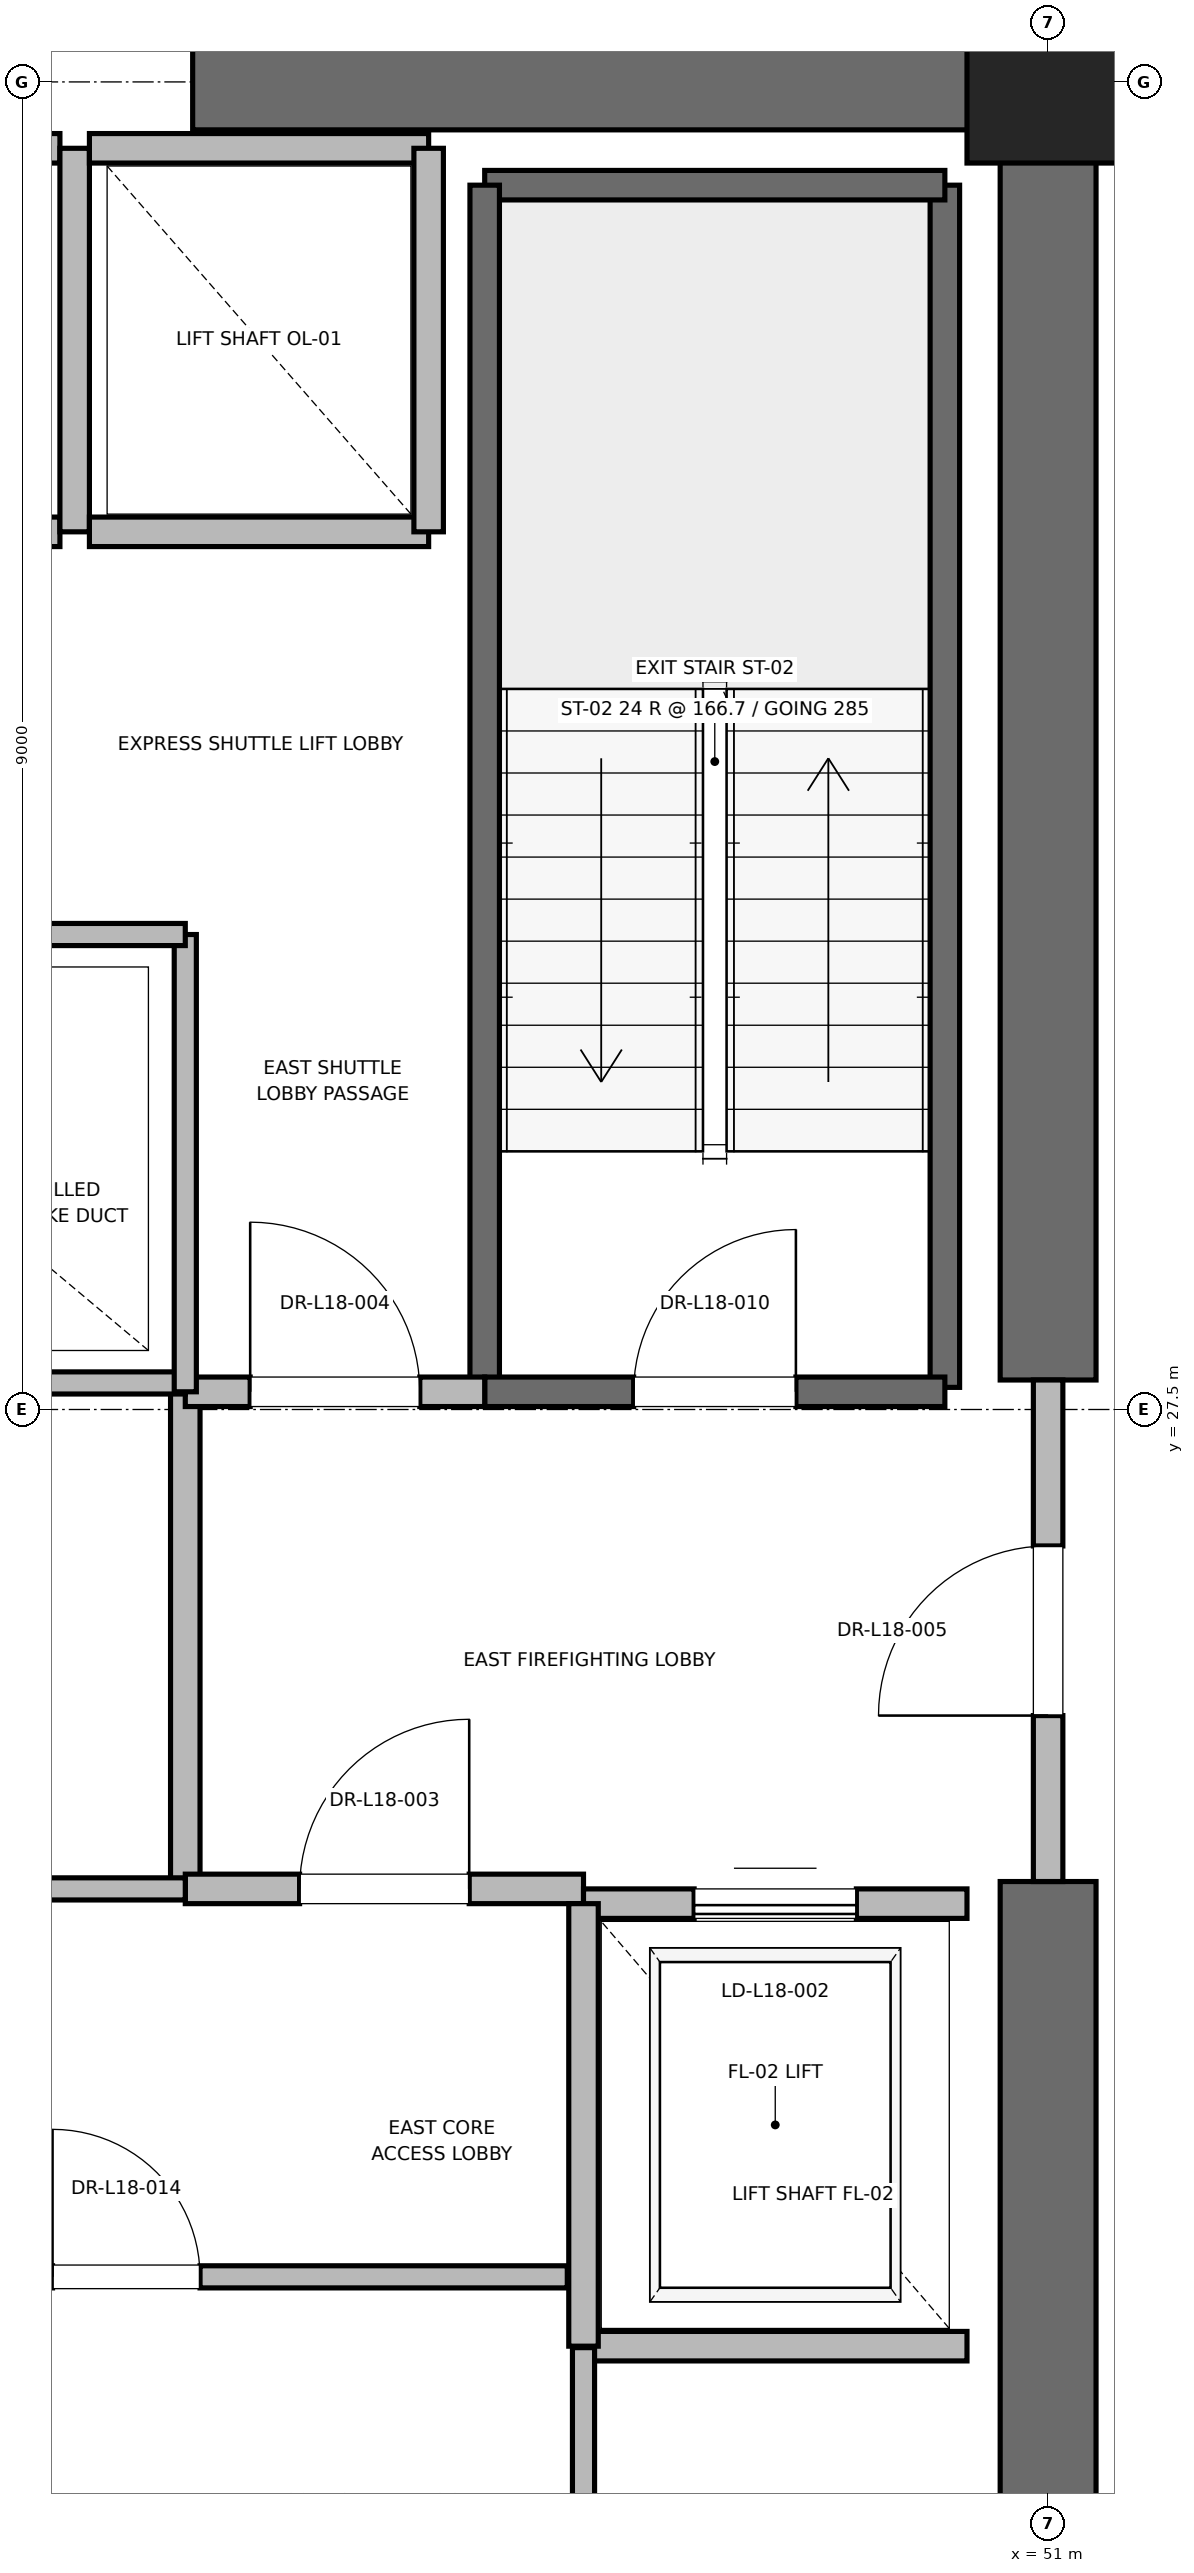
"""IFC4 building model, lengths in metres.
Left out: names, types, materials, properties, quantities, classifications, styles, units other than length and angle.
Written with IfcOpenShell. Run it as: python <this file> out.ifc"""

import sys

from ifc_helpers import new_model, si_unit, direction, frame, frame_2d, origin, origin_2d, place, context, subcontext, project, spatial, rectangle, extrude, element, fill, save


model = new_model("IFC4")
c1 = context("Model", 3, precision=1e-05, world=origin(), true_north=direction((0.0, 1.0)))
c2 = subcontext(c1, "Body", "Model", "MODEL_VIEW")
j1 = project(units=[si_unit("LENGTHUNIT", "METRE"), si_unit("PLANEANGLEUNIT", "RADIAN")], contexts=[c1])
p1 = place(None, origin())
s1 = spatial("IfcSite", under=j1, at=p1, CompositionType="ELEMENT")
p2 = place(p1, origin())
s2 = spatial("IfcBuilding", under=s1, at=p2, CompositionType="ELEMENT")
p3 = place(p2, frame((0.0, 0.0, 79.6)))
s3 = spatial("IfcBuildingStorey", under=s2, at=p3, CompositionType="ELEMENT", Elevation=79.6)
p4 = place(p3, frame((51.0, 36.5, 0.0), z_axis=(0.0, 0.0, 1.0), x_axis=(1.0, 0.0, 0.0)))
e1 = element("IfcColumn", 1, at=p4, inside=s3, PredefinedType="PILASTER", context=c2, shape_type="SweptSolid", body=[
    extrude(rectangle(XDim=1.1, YDim=1.1, at=origin_2d()), origin(), (0.0, 0.0, 1.0), 4.0),
])
for number, where, z_axis, x_axis in (
    (2, (45.2, 36.5, 0.0), (0.0, 0.0, 1.0), (1.0, 0.0, 0.0)),
    (3, (51.0, 18.5, 0.0), (0.0, 0.0, 1.0), (0.0, 1.0, 0.0)),
):
    element("IfcWall", number, at=place(p3, frame(where, z_axis=z_axis, x_axis=x_axis)), inside=s3, PredefinedType="SHEAR", context=c2, shape_type="SweptSolid", body=[
        extrude(rectangle(XDim=5.8, YDim=0.65, at=frame_2d((2.9, 0.0))), origin(), (0.0, 0.0, 1.0), 3.76),
    ])
p5 = place(p3, frame((51.0, 27.7, 0.0), z_axis=(0.0, 0.0, 1.0), x_axis=(0.0, 1.0, 0.0)))
e4 = element("IfcWall", 4, at=p5, inside=s3, PredefinedType="SHEAR", context=c2, shape_type="SweptSolid", body=[
    extrude(rectangle(XDim=8.8, YDim=0.65, at=frame_2d((4.4, 0.0))), origin(), (0.0, 0.0, 1.0), 3.76),
])
p6 = place(p3, frame((50.3, 27.65, 0.0), z_axis=(0.0, 0.0, 1.0), x_axis=(0.0, 1.0, 0.0)))
e5 = element("IfcWall", 5, at=p6, inside=s3, PredefinedType="SOLIDWALL", context=c2, shape_type="SweptSolid", body=[
    extrude(rectangle(XDim=8.15, YDim=0.2, at=frame_2d((4.075, 0.0))), origin(), (0.0, 0.0, 1.0), 3.76),
])
p7 = place(p3, frame((47.18, 35.8, 0.0), z_axis=(0.0, 0.0, 1.0), x_axis=(1.0, 0.0, 0.0)))
e6 = element("IfcWall", 6, at=p7, inside=s3, PredefinedType="SOLIDWALL", context=c2, shape_type="SweptSolid", body=[
    extrude(rectangle(XDim=3.12, YDim=0.2, at=frame_2d((1.56, 0.0))), origin(), (0.0, 0.0, 1.0), 3.76),
])
p8 = place(p3, frame((47.18, 27.62, 0.0), z_axis=(0.0, 0.0, 1.0), x_axis=(0.0, 1.0, 0.0)))
e7 = element("IfcWall", 7, at=p8, inside=s3, PredefinedType="SOLIDWALL", context=c2, shape_type="SweptSolid", body=[
    extrude(rectangle(XDim=8.18, YDim=0.2, at=frame_2d((4.09, 0.0))), origin(), (0.0, 0.0, 1.0), 3.76),
])
p9 = place(p3, frame((47.18, 27.62, 0.0), z_axis=(0.0, 0.0, 1.0), x_axis=(1.0, 0.0, 0.0)))
e8 = element("IfcWall", 8, at=p9, inside=s3, PredefinedType="SOLIDWALL", context=c2, shape_type="SweptSolid", body=[
    extrude(rectangle(XDim=3.12, YDim=0.2, at=frame_2d((1.56, 0.0))), origin(), (0.0, 0.0, 1.0), 3.76),
])
p10 = place(p9, frame((1.01, 0.0, 0.0)))
e9 = element("IfcOpeningElement", 9, at=p10, cuts=e8, PredefinedType="OPENING", context=c2, shape_type="SweptSolid", body=[
    extrude(rectangle(XDim=1.1, YDim=2.15, at=frame_2d((0.55, 1.075))), frame((0.0, 0.1, 0.0), z_axis=(0.0, -1.0, 0.0), x_axis=(1.0, 0.0, 0.0)), (0.0, 0.0, 1.0), 0.2),
])
p11 = place(p3, frame((45.15, 24.25, 0.0), z_axis=(0.0, 0.0, 1.0), x_axis=(0.0, 1.0, 0.0)))
e10 = element("IfcWall", 10, at=p11, inside=s3, PredefinedType="PARTITIONING", context=c2, shape_type="SweptSolid", body=[
    extrude(rectangle(XDim=3.37, YDim=0.2, at=frame_2d((1.685, 0.0))), origin(), (0.0, 0.0, 1.0), 3.76),
])
p12 = place(p3, frame((45.15, 24.25, 0.0), z_axis=(0.0, 0.0, 1.0), x_axis=(1.0, 0.0, 0.0)))
e11 = element("IfcWall", 11, at=p12, inside=s3, PredefinedType="PARTITIONING", context=c2, shape_type="SweptSolid", body=[
    extrude(rectangle(XDim=2.7, YDim=0.2, at=frame_2d((1.35, 0.0))), origin(), (0.0, 0.0, 1.0), 3.76),
])
p13 = place(p12, frame((0.775, 0.0, 0.0)))
e12 = element("IfcOpeningElement", 12, at=p13, cuts=e11, PredefinedType="OPENING", context=c2, shape_type="SweptSolid", body=[
    extrude(rectangle(XDim=1.15, YDim=2.2, at=frame_2d((0.575, 1.1))), frame((0.0, 0.1, 0.0), z_axis=(0.0, -1.0, 0.0), x_axis=(1.0, 0.0, 0.0)), (0.0, 0.0, 1.0), 0.2),
])
p14 = place(p3, frame((45.15, 27.62, 0.0), z_axis=(0.0, 0.0, 1.0), x_axis=(1.0, 0.0, 0.0)))
e13 = element("IfcWall", 13, at=p14, inside=s3, PredefinedType="PARTITIONING", context=c2, shape_type="SweptSolid", body=[
    extrude(rectangle(XDim=2.03, YDim=0.2, at=frame_2d((1.015, 0.0))), origin(), (0.0, 0.0, 1.0), 3.76),
])
p15 = place(p14, frame((0.44, 0.0, 0.0)))
e14 = element("IfcOpeningElement", 14, at=p15, cuts=e13, PredefinedType="OPENING", context=c2, shape_type="SweptSolid", body=[
    extrude(rectangle(XDim=1.15, YDim=2.2, at=frame_2d((0.575, 1.1))), frame((0.0, 0.1, 0.0), z_axis=(0.0, -1.0, 0.0), x_axis=(1.0, 0.0, 0.0)), (0.0, 0.0, 1.0), 0.2),
])
p16 = place(p3, frame((51.0, 24.3, 0.0), z_axis=(0.0, 0.0, 1.0), x_axis=(0.0, 1.0, 0.0)))
e15 = element("IfcWall", 15, at=p16, inside=s3, PredefinedType="PARTITIONING", context=c2, shape_type="SweptSolid", body=[
    extrude(rectangle(XDim=3.4, YDim=0.2, at=frame_2d((1.7, 0.0))), origin(), (0.0, 0.0, 1.0), 2.54),
])
p17 = place(p16, frame((1.125, 0.0, 0.0)))
e16 = element("IfcOpeningElement", 16, at=p17, cuts=e15, PredefinedType="OPENING", context=c2, shape_type="SweptSolid", body=[
    extrude(rectangle(XDim=1.15, YDim=2.2, at=frame_2d((0.575, 1.1))), frame((0.0, 0.1, 0.0), z_axis=(0.0, -1.0, 0.0), x_axis=(1.0, 0.0, 0.0)), (0.0, 0.0, 1.0), 0.2),
])
p18 = place(p3, frame((47.85, 21.15, 0.0), z_axis=(0.0, 0.0, 1.0), x_axis=(1.0, 0.0, 0.0)))
e17 = element("IfcWall", 17, at=p18, inside=s3, PredefinedType="SOLIDWALL", context=c2, shape_type="SweptSolid", body=[
    extrude(rectangle(XDim=2.6, YDim=0.2, at=frame_2d((1.3, 0.0))), origin(), (0.0, 0.0, 1.0), 3.76),
])
p19 = place(p3, frame((50.45, 24.15, 0.0), z_axis=(0.0, 0.0, 1.0), x_axis=(-1.0, 0.0, 0.0)))
e18 = element("IfcWall", 18, at=p19, inside=s3, PredefinedType="SOLIDWALL", context=c2, shape_type="SweptSolid", body=[
    extrude(rectangle(XDim=2.6, YDim=0.2, at=frame_2d((1.3, 0.0))), origin(), (0.0, 0.0, 1.0), 2.54),
])
p20 = place(p19, frame((0.75, 0.0, 0.0)))
e19 = element("IfcOpeningElement", 19, at=p20, cuts=e18, PredefinedType="OPENING", context=c2, shape_type="SweptSolid", body=[
    extrude(rectangle(XDim=1.1, YDim=2.2, at=frame_2d((0.55, 1.1))), frame((0.0, 0.1, 0.0), z_axis=(0.0, -1.0, 0.0), x_axis=(1.0, 0.0, 0.0)), (0.0, 0.0, 1.0), 0.2),
])
p21 = place(p3, frame((47.85, 24.15, 0.0), z_axis=(0.0, 0.0, 1.0), x_axis=(0.0, -1.0, 0.0)))
e20 = element("IfcWall", 20, at=p21, inside=s3, PredefinedType="SOLIDWALL", context=c2, shape_type="SweptSolid", body=[
    extrude(rectangle(XDim=3.0, YDim=0.2, at=frame_2d((1.5, 0.0))), origin(), (0.0, 0.0, 1.0), 3.76),
])
p22 = place(p3, frame((42.0, 33.45, 0.0), z_axis=(0.0, 0.0, 1.0), x_axis=(1.0, 0.0, 0.0)))
e21 = element("IfcWall", 21, at=p22, inside=s3, PredefinedType="SOLIDWALL", context=c2, shape_type="SweptSolid", body=[
    extrude(rectangle(XDim=2.3, YDim=0.2, at=frame_2d((1.15, 0.0))), origin(), (0.0, 0.0, 1.0), 3.76),
])
p23 = place(p3, frame((44.3, 36.05, 0.0), z_axis=(0.0, 0.0, 1.0), x_axis=(-1.0, 0.0, 0.0)))
e22 = element("IfcWall", 22, at=p23, inside=s3, PredefinedType="SOLIDWALL", context=c2, shape_type="SweptSolid", body=[
    extrude(rectangle(XDim=2.3, YDim=0.2, at=frame_2d((1.15, 0.0))), origin(), (0.0, 0.0, 1.0), 2.54),
])
p24 = place(p3, frame((44.4, 33.45, 0.0), z_axis=(0.0, 0.0, 1.0), x_axis=(0.0, 1.0, 0.0)))
e23 = element("IfcWall", 23, at=p24, inside=s3, PredefinedType="SOLIDWALL", context=c2, shape_type="SweptSolid", body=[
    extrude(rectangle(XDim=2.6, YDim=0.2, at=frame_2d((1.3, 0.0))), origin(), (0.0, 0.0, 1.0), 2.54),
])
p25 = place(p3, frame((44.5, 33.45, 0.0), z_axis=(0.0, 0.0, 1.0), x_axis=(1.0, 0.0, 0.0)))
e24 = element("IfcWall", 24, at=p25, inside=s3, PredefinedType="SOLIDWALL", context=c2, shape_type="SweptSolid", body=[
    extrude(rectangle(XDim=2.3, YDim=0.2, at=frame_2d((1.15, 0.0))), origin(), (0.0, 0.0, 1.0), 3.76),
])
p26 = place(p3, frame((46.8, 36.05, 0.0), z_axis=(0.0, 0.0, 1.0), x_axis=(-1.0, 0.0, 0.0)))
e25 = element("IfcWall", 25, at=p26, inside=s3, PredefinedType="SOLIDWALL", context=c2, shape_type="SweptSolid", body=[
    extrude(rectangle(XDim=2.3, YDim=0.2, at=frame_2d((1.15, 0.0))), origin(), (0.0, 0.0, 1.0), 2.54),
])
p27 = place(p3, frame((46.8, 33.45, 0.0), z_axis=(0.0, 0.0, 1.0), x_axis=(0.0, 1.0, 0.0)))
e26 = element("IfcWall", 26, at=p27, inside=s3, PredefinedType="SOLIDWALL", context=c2, shape_type="SweptSolid", body=[
    extrude(rectangle(XDim=2.6, YDim=0.2, at=frame_2d((1.3, 0.0))), origin(), (0.0, 0.0, 1.0), 3.76),
])
p28 = place(p3, frame((41.56, 27.68, 0.0), z_axis=(0.0, 0.0, 1.0), x_axis=(1.0, 0.0, 0.0)))
e27 = element("IfcWall", 27, at=p28, inside=s3, PredefinedType="PARTITIONING", context=c2, shape_type="SweptSolid", body=[
    extrude(rectangle(XDim=3.59, YDim=0.15, at=frame_2d((1.795, 0.0))), origin(), (0.0, 0.0, 1.0), 2.85),
])
p29 = place(p3, frame((47.85, 18.6, 0.0), z_axis=(0.0, 0.0, 1.0), x_axis=(0.0, 1.0, 0.0)))
e28 = element("IfcWall", 28, at=p29, inside=s3, PredefinedType="PARTITIONING", context=c2, shape_type="SweptSolid", body=[
    extrude(rectangle(XDim=2.54, YDim=0.15, at=frame_2d((1.27, 0.0))), origin(), (0.0, 0.0, 1.0), 2.85),
])
p30 = place(p3, frame((41.76, 21.62, 0.0), z_axis=(0.0, 0.0, 1.0), x_axis=(1.0, 0.0, 0.0)))
e29 = element("IfcWall", 29, at=p30, inside=s3, PredefinedType="PARTITIONING", context=c2, shape_type="SweptSolid", body=[
    extrude(rectangle(XDim=5.98, YDim=0.15, at=frame_2d((2.99, 0.0))), origin(), (0.0, 0.0, 1.0), 2.85),
])
p31 = place(p30, frame((2.49, 0.0, 0.0)))
e30 = element("IfcOpeningElement", 30, at=p31, cuts=e29, PredefinedType="OPENING", context=c2, shape_type="SweptSolid", body=[
    extrude(rectangle(XDim=1.0, YDim=2.15, at=frame_2d((0.5, 1.075))), frame((0.0, 0.075, 0.0), z_axis=(0.0, -1.0, 0.0), x_axis=(1.0, 0.0, 0.0)), (0.0, 0.0, 1.0), 0.15),
])
p32 = place(p3, frame((41.76, 24.25, 0.0), z_axis=(0.0, 0.0, 1.0), x_axis=(1.0, 0.0, 0.0)))
e31 = element("IfcWall", 31, at=p32, inside=s3, PredefinedType="PARTITIONING", context=c2, shape_type="SweptSolid", body=[
    extrude(rectangle(XDim=3.39, YDim=0.15, at=frame_2d((1.695, 0.0))), origin(), (0.0, 0.0, 1.0), 2.85),
])
p33 = place(p32, frame((1.195, 0.0, 0.0)))
e32 = element("IfcOpeningElement", 32, at=p33, cuts=e31, PredefinedType="OPENING", context=c2, shape_type="SweptSolid", body=[
    extrude(rectangle(XDim=1.0, YDim=2.15, at=frame_2d((0.5, 1.075))), frame((0.0, 0.075, 0.0), z_axis=(0.0, -1.0, 0.0), x_axis=(1.0, 0.0, 0.0)), (0.0, 0.0, 1.0), 0.15),
])
p34 = place(p3, frame((45.15, 27.62, 0.0), z_axis=(0.0, 0.0, 1.0), x_axis=(0.0, 1.0, 0.0)))
e33 = element("IfcWall", 33, at=p34, inside=s3, PredefinedType="PARTITIONING", context=c2, shape_type="SweptSolid", body=[
    extrude(rectangle(XDim=3.1, YDim=0.15, at=frame_2d((1.55, 0.0))), origin(), (0.0, 0.0, 1.0), 2.85),
])
p35 = place(p3, frame((41.56, 30.72, 0.0), z_axis=(0.0, 0.0, 1.0), x_axis=(1.0, 0.0, 0.0)))
e34 = element("IfcWall", 34, at=p35, inside=s3, PredefinedType="PARTITIONING", context=c2, shape_type="SweptSolid", body=[
    extrude(rectangle(XDim=3.59, YDim=0.15, at=frame_2d((1.795, 0.0))), origin(), (0.0, 0.0, 1.0), 2.85),
])
p36 = place(p35, frame((1.355, 0.0, 0.0)))
e35 = element("IfcOpeningElement", 35, at=p36, cuts=e34, PredefinedType="OPENING", context=c2, shape_type="SweptSolid", body=[
    extrude(rectangle(XDim=0.88, YDim=2.1, at=frame_2d((0.44, 1.05))), frame((0.0, 0.075, 0.0), z_axis=(0.0, -1.0, 0.0), x_axis=(1.0, 0.0, 0.0)), (0.0, 0.0, 1.0), 0.15),
])
p37 = place(p10, origin())
e36 = element("IfcDoor", 36, at=p37, inside=s3, OperationType="SINGLE_SWING_RIGHT", PredefinedType="DOOR", context=c2, shape_type="SweptSolid", body=[
    extrude(rectangle(XDim=1.1, YDim=2.15, at=frame_2d((0.55, 1.075))), frame((0.0, 0.025, 0.0), z_axis=(0.0, -1.0, 0.0), x_axis=(1.0, 0.0, 0.0)), (0.0, 0.0, 1.0), 0.05),
])
fill(e9, e36)
p38 = place(p13, origin())
e37 = element("IfcDoor", 37, at=p38, inside=s3, OperationType="SINGLE_SWING_RIGHT", PredefinedType="DOOR", context=c2, shape_type="SweptSolid", body=[
    extrude(rectangle(XDim=1.15, YDim=2.2, at=frame_2d((0.575, 1.1))), frame((0.0, 0.025, 0.0), z_axis=(0.0, -1.0, 0.0), x_axis=(1.0, 0.0, 0.0)), (0.0, 0.0, 1.0), 0.05),
])
fill(e12, e37)
p39 = place(p15, origin())
e38 = element("IfcDoor", 38, at=p39, inside=s3, OperationType="SINGLE_SWING_LEFT", PredefinedType="DOOR", context=c2, shape_type="SweptSolid", body=[
    extrude(rectangle(XDim=1.15, YDim=2.2, at=frame_2d((0.575, 1.1))), frame((0.0, 0.025, 0.0), z_axis=(0.0, -1.0, 0.0), x_axis=(1.0, 0.0, 0.0)), (0.0, 0.0, 1.0), 0.05),
])
fill(e14, e38)
p40 = place(p17, origin())
e39 = element("IfcDoor", 39, at=p40, inside=s3, OperationType="SINGLE_SWING_LEFT", PredefinedType="DOOR", context=c2, shape_type="SweptSolid", body=[
    extrude(rectangle(XDim=1.15, YDim=2.2, at=frame_2d((0.575, 1.1))), frame((0.0, 0.025, 0.0), z_axis=(0.0, -1.0, 0.0), x_axis=(1.0, 0.0, 0.0)), (0.0, 0.0, 1.0), 0.05),
])
fill(e16, e39)
p41 = place(p20, origin())
e40 = element("IfcDoor", 40, at=p41, inside=s3, OperationType="SLIDING_TO_RIGHT", PredefinedType="DOOR", context=c2, shape_type="SweptSolid", body=[
    extrude(rectangle(XDim=1.1, YDim=2.2, at=frame_2d((0.55, 1.1))), frame((0.0, 0.025, 0.0), z_axis=(0.0, -1.0, 0.0), x_axis=(1.0, 0.0, 0.0)), (0.0, 0.0, 1.0), 0.05),
])
fill(e19, e40)
p42 = place(p31, origin())
e41 = element("IfcDoor", 41, at=p42, inside=s3, OperationType="SINGLE_SWING_LEFT", PredefinedType="DOOR", context=c2, shape_type="SweptSolid", body=[
    extrude(rectangle(XDim=1.0, YDim=2.15, at=frame_2d((0.5, 1.075))), frame((0.0, 0.025, 0.0), z_axis=(0.0, -1.0, 0.0), x_axis=(1.0, 0.0, 0.0)), (0.0, 0.0, 1.0), 0.05),
])
fill(e30, e41)
save(model, sys.argv[1])
